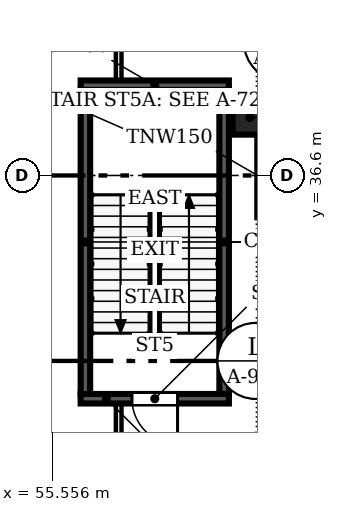
"""IFC4 building model, lengths in metres.
Left out: names, types, materials, properties, quantities, classifications, styles, units other than length and angle.
Written with IfcOpenShell. Run it as: python <this file> out.ifc"""

import sys

from ifc_helpers import new_model, si_unit, direction, frame, frame_2d, origin, origin_2d, place, context, subcontext, project, spatial, rectangle, extrude, source, transform, mapped, element, fill, save


model = new_model("IFC4")
c1 = context("Model", 3, precision=1e-05, world=origin(), true_north=direction((0.0, 1.0)))
c2 = subcontext(c1, "Body", "Model", "MODEL_VIEW")
j1 = project(units=[si_unit("LENGTHUNIT", "METRE"), si_unit("PLANEANGLEUNIT", "RADIAN")], contexts=[c1])
p1 = place(None, origin())
s1 = spatial("IfcSite", under=j1, at=p1, CompositionType="ELEMENT")
p2 = place(p1, origin())
s2 = spatial("IfcBuilding", under=s1, at=p2, CompositionType="ELEMENT")
p3 = place(p2, frame((0.0, 0.0, 12.0)))
s3 = spatial("IfcBuildingStorey", under=s2, at=p3, CompositionType="ELEMENT", Elevation=12.0)
p4 = place(p3, frame((60.75, 38.125, 0.0), z_axis=(0.0, 0.0, 1.0), x_axis=(1.0, 0.0, 0.0)))
e1 = element("IfcColumn", 1, at=p4, inside=s3, PredefinedType="COLUMN", context=c2, shape_type="SweptSolid", body=[
    extrude(rectangle(XDim=0.9, YDim=0.9, at=origin_2d()), origin(), (0.0, 0.0, 1.0), 4.6),
])
p5 = place(p3, frame((60.2, 30.725, 0.0), z_axis=(0.0, 0.0, 1.0), x_axis=(-1.0, 0.0, 0.0)))
e2 = element("IfcWall", 2, at=p5, inside=s3, PredefinedType="SOLIDWALL", context=c2, shape_type="SweptSolid", body=[
    extrude(rectangle(XDim=3.9, YDim=0.25, at=frame_2d((1.95, 0.0))), origin(), (0.0, 0.0, 1.0), 4.8),
])
m1 = source(origin(), c2, "Body", "SweptSolid", [
    extrude(rectangle(XDim=1.2, YDim=2.1, at=frame_2d((0.6, 1.05))), frame((0.0, 0.135, 0.0), z_axis=(0.0, -1.0, 0.0), x_axis=(1.0, 0.0, 0.0)), (0.0, 0.0, 1.0), 0.27),
])
p6 = place(p5, frame((1.35, 0.0, 0.0)))
e3 = element("IfcOpeningElement", 3, at=p6, cuts=e2, PredefinedType="OPENING", context=c2, shape_type="MappedRepresentation", body=[
    mapped(m1, transform((0.0, 0.0, 0.0), scale=1.0)),
])
p7 = place(p3, frame((56.425, 30.85, 0.0), z_axis=(0.0, 0.0, 1.0), x_axis=(0.0, 1.0, 0.0)))
e4 = element("IfcWall", 4, at=p7, inside=s3, PredefinedType="SOLIDWALL", context=c2, shape_type="SweptSolid", body=[
    extrude(rectangle(XDim=8.0, YDim=0.25, at=frame_2d((4.0, 0.0))), origin(), (0.0, 0.0, 1.0), 4.8),
])
p8 = place(p3, frame((56.3, 38.975, 0.0), z_axis=(0.0, 0.0, 1.0), x_axis=(1.0, 0.0, 0.0)))
e5 = element("IfcWall", 5, at=p8, inside=s3, PredefinedType="SOLIDWALL", context=c2, shape_type="SweptSolid", body=[
    extrude(rectangle(XDim=3.9, YDim=0.25, at=frame_2d((1.95, 0.0))), origin(), (0.0, 0.0, 1.0), 4.8),
])
p9 = place(p3, frame((60.075, 38.85, 0.0), z_axis=(0.0, 0.0, 1.0), x_axis=(0.0, -1.0, 0.0)))
e6 = element("IfcWall", 6, at=p9, inside=s3, PredefinedType="SOLIDWALL", context=c2, shape_type="SweptSolid", body=[
    extrude(rectangle(XDim=8.0, YDim=0.25, at=frame_2d((4.0, 0.0))), origin(), (0.0, 0.0, 1.0), 4.8),
])
p10 = place(p3, frame((57.3, 30.6, 0.0), z_axis=(0.0, 0.0, 1.0), x_axis=(0.0, -1.0, 0.0)))
e7 = element("IfcWall", 7, at=p10, inside=s3, PredefinedType="PARTITIONING", context=c2, shape_type="SweptSolid", body=[
    extrude(rectangle(XDim=8.6, YDim=0.15, at=frame_2d((4.3, 0.0))), origin(), (0.0, 0.0, 1.0), 3.672),
])
m2 = source(origin(), c2, "Body", "SweptSolid", [
    extrude(rectangle(XDim=1.0, YDim=2.1, at=frame_2d((0.5, 1.05))), frame((0.0, 0.085, 0.0), z_axis=(0.0, -1.0, 0.0), x_axis=(1.0, 0.0, 0.0)), (0.0, 0.0, 1.0), 0.17),
])
p11 = place(p10, frame((3.8, 0.0, 0.0)))
e8 = element("IfcOpeningElement", 8, at=p11, cuts=e7, PredefinedType="OPENING", context=c2, shape_type="MappedRepresentation", body=[
    mapped(m2, transform((0.0, 0.0, 0.0), scale=1.0)),
])
p12 = place(p3, frame((61.0, 29.951, 0.0), z_axis=(0.0, 0.0, 1.0), x_axis=(0.0, 1.0, 0.0)))
e9 = element("IfcWall", 9, at=p12, inside=s3, PredefinedType="PARTITIONING", context=c2, shape_type="SweptSolid", body=[
    extrude(rectangle(XDim=2.973, YDim=0.15, at=frame_2d((1.487, 0.0))), origin(), (0.0, 0.0, 1.0), 3.672),
])
p13 = place(p3, frame((61.0, 33.076, 0.0), z_axis=(0.0, 0.0, 1.0), x_axis=(0.0, 1.0, 0.0)))
e10 = element("IfcWall", 10, at=p13, inside=s3, PredefinedType="PARTITIONING", context=c2, shape_type="SweptSolid", body=[
    extrude(rectangle(XDim=2.248, YDim=0.15, at=frame_2d((1.124, 0.0))), origin(), (0.0, 0.0, 1.0), 3.672),
])
p14 = place(p3, frame((61.0, 35.476, 0.0), z_axis=(0.0, 0.0, 1.0), x_axis=(0.0, 1.0, 0.0)))
e11 = element("IfcWall", 11, at=p14, inside=s3, PredefinedType="PARTITIONING", context=c2, shape_type="SweptSolid", body=[
    extrude(rectangle(XDim=2.198, YDim=0.15, at=frame_2d((1.099, 0.0))), origin(), (0.0, 0.0, 1.0), 3.672),
])
p15 = place(p3, frame((61.0, 38.576, 0.0), z_axis=(0.0, 0.0, 1.0), x_axis=(0.0, 1.0, 0.0)))
e12 = element("IfcWall", 12, at=p15, inside=s3, PredefinedType="PARTITIONING", context=c2, shape_type="SweptSolid", body=[
    extrude(rectangle(XDim=9.773, YDim=0.15, at=frame_2d((4.887, 0.0))), origin(), (0.0, 0.0, 1.0), 3.672),
])
p16 = place(p3, frame((57.3, 39.1, 0.0), z_axis=(0.0, 0.0, 1.0), x_axis=(0.0, 1.0, 0.0)))
e13 = element("IfcWall", 13, at=p16, inside=s3, PredefinedType="PARTITIONING", context=c2, shape_type="SweptSolid", body=[
    extrude(rectangle(XDim=12.1, YDim=0.15, at=frame_2d((6.05, 0.0))), origin(), (0.0, 0.0, 1.0), 3.672),
])
m3 = source(origin(), c2, "Body", "SweptSolid", [
    extrude(rectangle(XDim=1.2, YDim=2.1, at=frame_2d((0.6, 1.05))), frame((0.0, 0.025, 0.0), z_axis=(0.0, -1.0, 0.0), x_axis=(1.0, 0.0, 0.0)), (0.0, 0.0, 1.0), 0.05),
])
p17 = place(p6, origin())
e14 = element("IfcDoor", 14, at=p17, inside=s3, OperationType="SINGLE_SWING_LEFT", PredefinedType="DOOR", context=c2, shape_type="MappedRepresentation", body=[
    mapped(m3, transform((0.0, 0.0, 0.0), scale=1.0)),
])
fill(e3, e14)
save(model, sys.argv[1])
